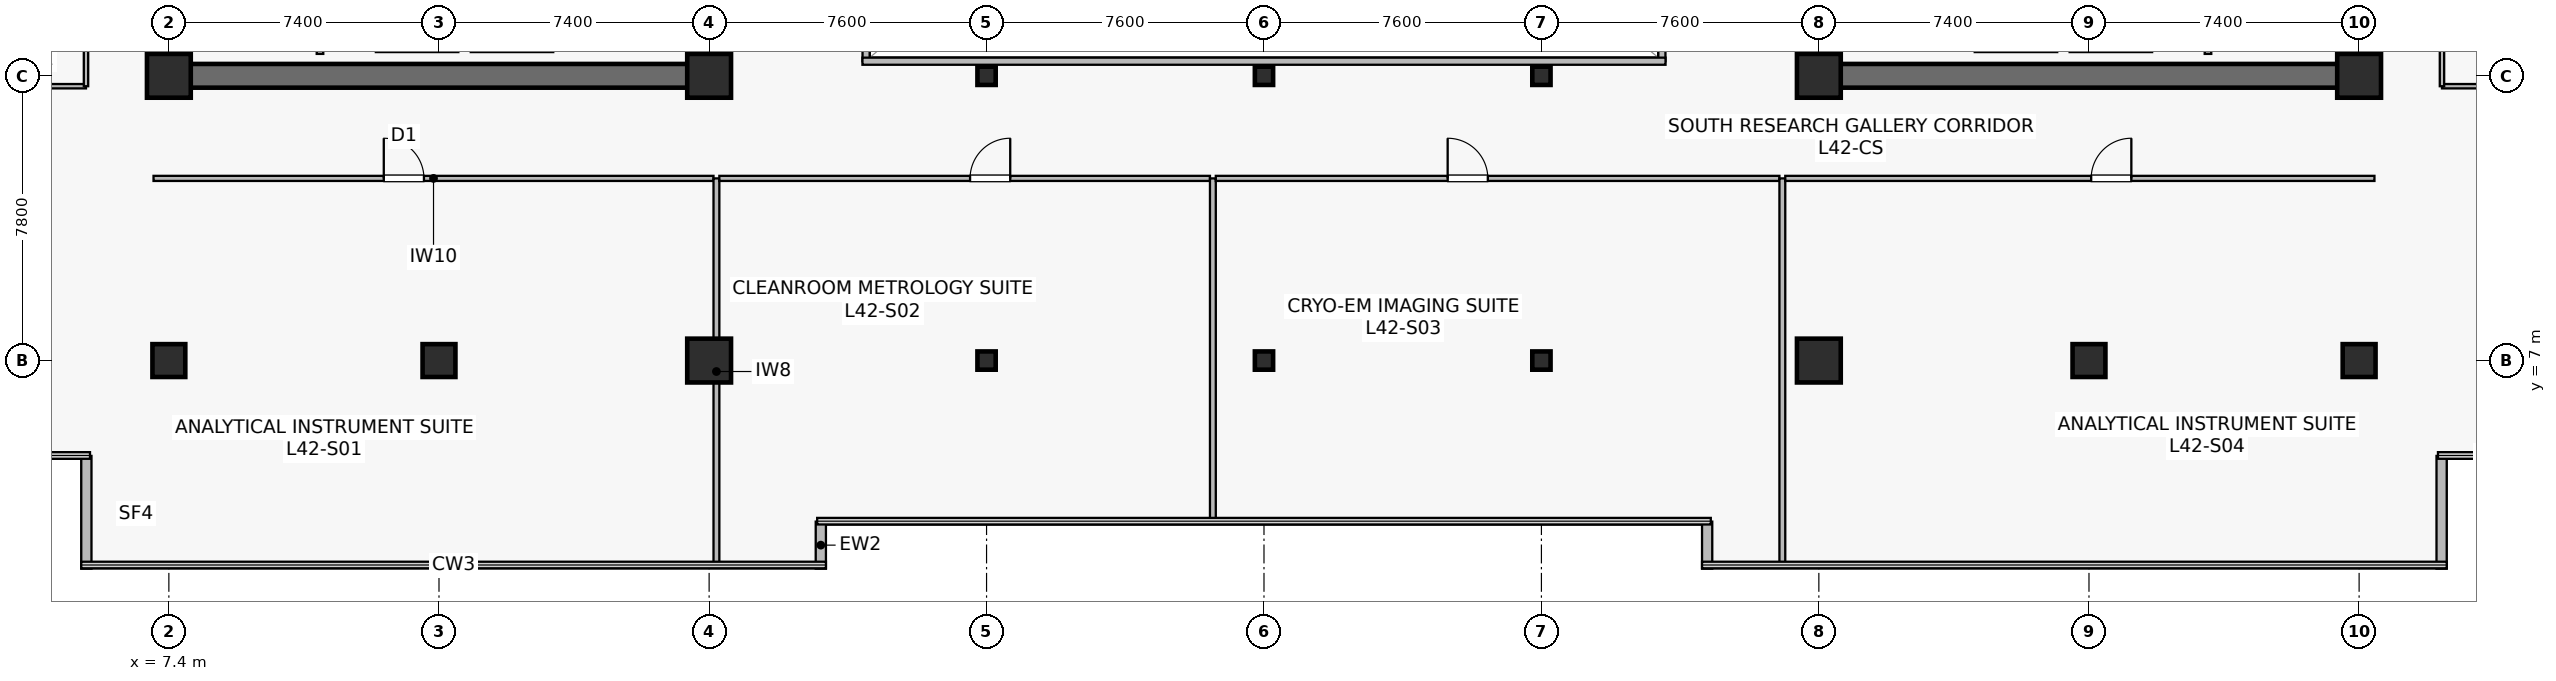
"""IFC4 building model, lengths in metres.
Left out: names, types, materials, properties, quantities, classifications, styles, units other than length and angle.
Written with IfcOpenShell. Run it as: python <this file> out.ifc"""

import sys

from ifc_helpers import new_model, si_unit, direction, frame, frame_2d, origin, origin_2d, place, context, subcontext, project, spatial, rectangle, hollow_rectangle, extrude, source, transform, mapped, element, fill, save


model = new_model("IFC4")
c1 = context("Model", 3, precision=1e-05, world=origin(), true_north=direction((0.0, 1.0)))
c2 = subcontext(c1, "Body", "Model", "MODEL_VIEW")
j1 = project(units=[si_unit("LENGTHUNIT", "METRE"), si_unit("PLANEANGLEUNIT", "RADIAN")], contexts=[c1])
p1 = place(None, origin())
s1 = spatial("IfcSite", under=j1, at=p1, CompositionType="ELEMENT")
p2 = place(p1, origin())
s2 = spatial("IfcBuilding", under=s1, at=p2, CompositionType="ELEMENT")
p3 = place(p2, frame((0.0, 0.0, 174.8)))
s3 = spatial("IfcBuildingStorey", under=s2, at=p3, CompositionType="ELEMENT", Elevation=174.8)
p4 = place(p3, frame((7.075, 14.8, 0.0), z_axis=(0.0, 0.0, 1.0), x_axis=(1.0, 0.0, 0.0)))
e1 = element("IfcWall", 1, at=p4, inside=s3, PredefinedType="SHEAR", context=c2, shape_type="SweptSolid", body=[
    extrude(rectangle(XDim=15.45, YDim=0.65, at=frame_2d((7.725, 0.0))), origin(), (0.0, 0.0, 1.0), 3.79),
])
p5 = place(p3, frame((7.4, 15.125, 0.0), z_axis=(0.0, 0.0, 1.0), x_axis=(0.0, 1.0, 0.0)))
e2 = element("IfcWall", 2, at=p5, inside=s3, PredefinedType="SHEAR", context=c2, shape_type="SweptSolid", body=[
    extrude(rectangle(XDim=18.35, YDim=0.65, at=frame_2d((9.175, 0.0))), origin(), (0.0, 0.0, 1.0), 3.79),
])
p6 = place(p3, frame((22.2, 15.125, 0.0), z_axis=(0.0, 0.0, 1.0), x_axis=(0.0, 1.0, 0.0)))
e3 = element("IfcWall", 3, at=p6, inside=s3, PredefinedType="SHEAR", context=c2, shape_type="SweptSolid", body=[
    extrude(rectangle(XDim=18.35, YDim=0.65, at=frame_2d((9.175, 0.0))), origin(), (0.0, 0.0, 1.0), 3.79),
])
p7 = place(p6, frame((3.425, 0.0, 0.0)))
e4 = element("IfcOpeningElement", 4, at=p7, cuts=e3, PredefinedType="OPENING", context=c2, shape_type="SweptSolid", body=[
    extrude(rectangle(XDim=1.42, YDim=2.2, at=frame_2d((0.71, 1.1))), frame((0.0, 0.335, 0.0), z_axis=(0.0, -1.0, 0.0), x_axis=(1.0, 0.0, 0.0)), (0.0, 0.0, 1.0), 0.67),
])
p8 = place(p3, frame((52.275, 14.8, 0.0), z_axis=(0.0, 0.0, 1.0), x_axis=(1.0, 0.0, 0.0)))
e5 = element("IfcWall", 5, at=p8, inside=s3, PredefinedType="SHEAR", context=c2, shape_type="SweptSolid", body=[
    extrude(rectangle(XDim=15.45, YDim=0.65, at=frame_2d((7.725, 0.0))), origin(), (0.0, 0.0, 1.0), 3.79),
])
p9 = place(p3, frame((52.6, 15.125, 0.0), z_axis=(0.0, 0.0, 1.0), x_axis=(0.0, 1.0, 0.0)))
e6 = element("IfcWall", 6, at=p9, inside=s3, PredefinedType="SHEAR", context=c2, shape_type="SweptSolid", body=[
    extrude(rectangle(XDim=18.35, YDim=0.65, at=frame_2d((9.175, 0.0))), origin(), (0.0, 0.0, 1.0), 3.79),
])
p10 = place(p9, frame((3.425, 0.0, 0.0)))
e7 = element("IfcOpeningElement", 7, at=p10, cuts=e6, PredefinedType="OPENING", context=c2, shape_type="SweptSolid", body=[
    extrude(rectangle(XDim=1.42, YDim=2.2, at=frame_2d((0.71, 1.1))), frame((0.0, 0.335, 0.0), z_axis=(0.0, -1.0, 0.0), x_axis=(1.0, 0.0, 0.0)), (0.0, 0.0, 1.0), 0.67),
])
p11 = place(p3, frame((67.4, 15.125, 0.0), z_axis=(0.0, 0.0, 1.0), x_axis=(0.0, 1.0, 0.0)))
e8 = element("IfcWall", 8, at=p11, inside=s3, PredefinedType="SHEAR", context=c2, shape_type="SweptSolid", body=[
    extrude(rectangle(XDim=18.35, YDim=0.65, at=frame_2d((9.175, 0.0))), origin(), (0.0, 0.0, 1.0), 3.79),
])
m1 = source(origin(), c2, "Body", "SweptSolid", [
    extrude(rectangle(XDim=0.9, YDim=0.9, at=origin_2d()), origin(), (0.0, 0.0, 1.0), 4.1),
])
p12 = place(p3, frame((14.8, 7.0, 0.0), z_axis=(0.0, 0.0, 1.0), x_axis=(1.0, 0.0, 0.0)))
e9 = element("IfcColumn", 9, at=p12, inside=s3, PredefinedType="COLUMN", context=c2, shape_type="MappedRepresentation", body=[
    mapped(m1, transform((0.0, 0.0, 0.0), scale=1.0)),
])
m2 = source(origin(), c2, "Body", "SweptSolid", [
    extrude(rectangle(XDim=1.2, YDim=1.2, at=origin_2d()), origin(), (0.0, 0.0, 1.0), 4.1),
])
for number, where, z_axis, x_axis in (
    (10, (22.2, 7.0, 0.0), (0.0, 0.0, 1.0), (1.0, 0.0, 0.0)),
    (11, (7.4, 14.8, 0.0), (0.0, 0.0, 1.0), (1.0, 0.0, 0.0)),
    (12, (22.2, 14.8, 0.0), (0.0, 0.0, 1.0), (1.0, 0.0, 0.0)),
    (13, (52.6, 7.0, 0.0), (0.0, 0.0, 1.0), (1.0, 0.0, 0.0)),
):
    element("IfcColumn", number, at=place(p3, frame(where, z_axis=z_axis, x_axis=x_axis)), inside=s3, PredefinedType="COLUMN", context=c2, shape_type="MappedRepresentation", body=[
        mapped(m2, transform((0.0, 0.0, 0.0), scale=1.0)),
    ])
p13 = place(p3, frame((60.0, 7.0, 0.0), z_axis=(0.0, 0.0, 1.0), x_axis=(1.0, 0.0, 0.0)))
e14 = element("IfcColumn", 14, at=p13, inside=s3, PredefinedType="COLUMN", context=c2, shape_type="MappedRepresentation", body=[
    mapped(m1, transform((0.0, 0.0, 0.0), scale=1.0)),
])
for number, where, z_axis, x_axis in (
    (15, (52.6, 14.8, 0.0), (0.0, 0.0, 1.0), (1.0, 0.0, 0.0)),
    (16, (67.4, 14.8, 0.0), (0.0, 0.0, 1.0), (1.0, 0.0, 0.0)),
):
    element("IfcColumn", number, at=place(p3, frame(where, z_axis=z_axis, x_axis=x_axis)), inside=s3, PredefinedType="COLUMN", context=c2, shape_type="MappedRepresentation", body=[
        mapped(m2, transform((0.0, 0.0, 0.0), scale=1.0)),
    ])
for number, where, z_axis, x_axis in (
    (17, (7.4, 7.0, 0.0), (0.0, 0.0, 1.0), (1.0, 0.0, 0.0)),
    (18, (67.4, 7.0, 0.0), (0.0, 0.0, 1.0), (1.0, 0.0, 0.0)),
):
    element("IfcColumn", number, at=place(p3, frame(where, z_axis=z_axis, x_axis=x_axis)), inside=s3, PredefinedType="COLUMN", context=c2, shape_type="MappedRepresentation", body=[
        mapped(m1, transform((0.0, 0.0, 0.0), scale=1.0)),
    ])
m3 = source(origin(), c2, "Body", "SweptSolid", [
    extrude(hollow_rectangle(XDim=0.5, YDim=0.5, WallThickness=0.022, at=origin_2d()), origin(), (0.0, 0.0, 1.0), 4.1),
])
for number, where, z_axis, x_axis in (
    (19, (29.8, 7.0, 0.0), (0.0, 0.0, 1.0), (1.0, 0.0, 0.0)),
    (20, (29.8, 14.8, 0.0), (0.0, 0.0, 1.0), (1.0, 0.0, 0.0)),
    (21, (37.4, 7.0, 0.0), (0.0, 0.0, 1.0), (1.0, 0.0, 0.0)),
    (22, (37.4, 14.8, 0.0), (0.0, 0.0, 1.0), (1.0, 0.0, 0.0)),
    (23, (45.0, 7.0, 0.0), (0.0, 0.0, 1.0), (1.0, 0.0, 0.0)),
    (24, (45.0, 14.8, 0.0), (0.0, 0.0, 1.0), (1.0, 0.0, 0.0)),
):
    element("IfcColumn", number, at=place(p3, frame(where, z_axis=z_axis, x_axis=x_axis)), inside=s3, PredefinedType="COLUMN", context=c2, shape_type="MappedRepresentation", body=[
        mapped(m3, transform((0.0, 0.0, 0.0), scale=1.0)),
    ])
for number, where, z_axis, x_axis in (
    (25, (25.26, 1.3, 0.0), (0.0, 0.0, 1.0), (0.0, 1.0, 0.0)),
    (26, (49.54, 2.588, 0.0), (0.0, 0.0, 1.0), (0.0, -1.0, 0.0)),
):
    element("IfcWall", number, at=place(p3, frame(where, z_axis=z_axis, x_axis=x_axis)), inside=s3, PredefinedType="STANDARD", context=c2, shape_type="SweptSolid", body=[
        extrude(rectangle(XDim=1.288, YDim=0.28, at=frame_2d((0.644, 0.0))), origin(), (0.0, 0.0, 1.0), 3.79),
    ])
for number, where, z_axis, x_axis in (
    (27, (69.66, 1.3, 0.0), (0.0, 0.0, 1.0), (0.0, 1.0, 0.0)),
    (28, (5.14, 4.388, 0.0), (0.0, 0.0, 1.0), (0.0, -1.0, 0.0)),
):
    element("IfcWall", number, at=place(p3, frame(where, z_axis=z_axis, x_axis=x_axis)), inside=s3, PredefinedType="STANDARD", context=c2, shape_type="SweptSolid", body=[
        extrude(rectangle(XDim=3.088, YDim=0.28, at=frame_2d((1.544, 0.0))), origin(), (0.0, 0.0, 1.0), 3.79),
    ])
p14 = place(p3, frame((13.07, 15.55, 0.0), z_axis=(0.0, 0.0, 1.0), x_axis=(1.0, 0.0, 0.0)))
e29 = element("IfcWall", 29, at=p14, inside=s3, PredefinedType="SOLIDWALL", context=c2, shape_type="SweptSolid", body=[
    extrude(rectangle(XDim=2.26, YDim=0.2, at=frame_2d((1.13, 0.0))), origin(), (0.0, 0.0, 1.0), 3.187),
])
p15 = place(p3, frame((15.67, 15.55, 0.0), z_axis=(0.0, 0.0, 1.0), x_axis=(1.0, 0.0, 0.0)))
e30 = element("IfcWall", 30, at=p15, inside=s3, PredefinedType="SOLIDWALL", context=c2, shape_type="SweptSolid", body=[
    extrude(rectangle(XDim=2.26, YDim=0.2, at=frame_2d((1.13, 0.0))), origin(), (0.0, 0.0, 1.0), 3.79),
])
p16 = place(p3, frame((11.54, 15.4, 0.0), z_axis=(0.0, 0.0, 1.0), x_axis=(0.0, 1.0, 0.0)))
e31 = element("IfcWall", 31, at=p16, inside=s3, PredefinedType="SOLIDWALL", context=c2, shape_type="SweptSolid", body=[
    extrude(rectangle(XDim=2.4, YDim=0.18, at=frame_2d((1.2, 0.0))), origin(), (0.0, 0.0, 1.0), 3.79),
])
p17 = place(p3, frame((59.47, 15.55, 0.0), z_axis=(0.0, 0.0, 1.0), x_axis=(1.0, 0.0, 0.0)))
e32 = element("IfcWall", 32, at=p17, inside=s3, PredefinedType="SOLIDWALL", context=c2, shape_type="SweptSolid", body=[
    extrude(rectangle(XDim=2.26, YDim=0.2, at=frame_2d((1.13, 0.0))), origin(), (0.0, 0.0, 1.0), 3.187),
])
p18 = place(p3, frame((56.87, 15.55, 0.0), z_axis=(0.0, 0.0, 1.0), x_axis=(1.0, 0.0, 0.0)))
e33 = element("IfcWall", 33, at=p18, inside=s3, PredefinedType="SOLIDWALL", context=c2, shape_type="SweptSolid", body=[
    extrude(rectangle(XDim=2.26, YDim=0.2, at=frame_2d((1.13, 0.0))), origin(), (0.0, 0.0, 1.0), 3.79),
])
p19 = place(p3, frame((63.26, 15.4, 0.0), z_axis=(0.0, 0.0, 1.0), x_axis=(0.0, 1.0, 0.0)))
e34 = element("IfcWall", 34, at=p19, inside=s3, PredefinedType="SOLIDWALL", context=c2, shape_type="SweptSolid", body=[
    extrude(rectangle(XDim=2.4, YDim=0.18, at=frame_2d((1.2, 0.0))), origin(), (0.0, 0.0, 1.0), 3.79),
])
p20 = place(p3, frame((26.5, 15.2, 0.0), z_axis=(0.0, 0.0, 1.0), x_axis=(0.0, 1.0, 0.0)))
e35 = element("IfcWall", 35, at=p20, inside=s3, PredefinedType="SOLIDWALL", context=c2, shape_type="SweptSolid", body=[
    extrude(rectangle(XDim=18.2, YDim=0.195, at=frame_2d((9.1, 0.0))), origin(), (0.0, 0.0, 1.0), 3.79),
])
p21 = place(p20, frame((1.8, 0.0, 0.9)))
e36 = element("IfcOpeningElement", 36, at=p21, cuts=e35, PredefinedType="OPENING", context=c2, shape_type="SweptSolid", body=[
    extrude(rectangle(XDim=1.5, YDim=1.4, at=frame_2d((0.75, 0.7))), frame((0.0, 0.107, 0.0), z_axis=(0.0, -1.0, 0.0), x_axis=(1.0, 0.0, 0.0)), (0.0, 0.0, 1.0), 0.215),
])
p22 = place(p20, frame((13.2, 0.0, 0.9)))
e37 = element("IfcOpeningElement", 37, at=p22, cuts=e35, PredefinedType="OPENING", context=c2, shape_type="SweptSolid", body=[
    extrude(rectangle(XDim=1.5, YDim=1.4, at=frame_2d((0.75, 0.7))), frame((0.0, 0.107, 0.0), z_axis=(0.0, -1.0, 0.0), x_axis=(1.0, 0.0, 0.0)), (0.0, 0.0, 1.0), 0.215),
])
p23 = place(p3, frame((48.3, 15.2, 0.0), z_axis=(0.0, 0.0, 1.0), x_axis=(0.0, 1.0, 0.0)))
e38 = element("IfcWall", 38, at=p23, inside=s3, PredefinedType="SOLIDWALL", context=c2, shape_type="SweptSolid", body=[
    extrude(rectangle(XDim=18.2, YDim=0.195, at=frame_2d((9.1, 0.0))), origin(), (0.0, 0.0, 1.0), 3.79),
])
p24 = place(p23, frame((1.8, 0.0, 0.9)))
e39 = element("IfcOpeningElement", 39, at=p24, cuts=e38, PredefinedType="OPENING", context=c2, shape_type="SweptSolid", body=[
    extrude(rectangle(XDim=1.5, YDim=1.4, at=frame_2d((0.75, 0.7))), frame((0.0, 0.107, 0.0), z_axis=(0.0, -1.0, 0.0), x_axis=(1.0, 0.0, 0.0)), (0.0, 0.0, 1.0), 0.215),
])
p25 = place(p23, frame((13.2, 0.0, 0.9)))
e40 = element("IfcOpeningElement", 40, at=p25, cuts=e38, PredefinedType="OPENING", context=c2, shape_type="SweptSolid", body=[
    extrude(rectangle(XDim=1.5, YDim=1.4, at=frame_2d((0.75, 0.7))), frame((0.0, 0.107, 0.0), z_axis=(0.0, -1.0, 0.0), x_axis=(1.0, 0.0, 0.0)), (0.0, 0.0, 1.0), 0.215),
])
p26 = place(p3, frame((26.4, 15.2, 0.0), z_axis=(0.0, 0.0, 1.0), x_axis=(1.0, 0.0, 0.0)))
e41 = element("IfcWall", 41, at=p26, inside=s3, PredefinedType="SOLIDWALL", context=c2, shape_type="SweptSolid", body=[
    extrude(rectangle(XDim=22.0, YDim=0.195, at=frame_2d((11.0, 0.0))), origin(), (0.0, 0.0, 1.0), 3.79),
])
p27 = place(p3, frame((6.98, 11.99, 0.0), z_axis=(0.0, 0.0, 1.0), x_axis=(1.0, 0.0, 0.0)))
e42 = element("IfcWall", 42, at=p27, inside=s3, PredefinedType="PARTITIONING", context=c2, shape_type="SweptSolid", body=[
    extrude(rectangle(XDim=15.34, YDim=0.14, at=frame_2d((7.67, 0.0))), origin(), (0.0, 0.0, 1.0), 3.187),
])
p28 = place(p27, frame((6.308, 0.0, 0.0)))
e43 = element("IfcOpeningElement", 43, at=p28, cuts=e42, PredefinedType="OPENING", context=c2, shape_type="SweptSolid", body=[
    extrude(rectangle(XDim=1.1, YDim=2.18, at=frame_2d((0.55, 1.09))), frame((0.0, 0.08, 0.0), z_axis=(0.0, -1.0, 0.0), x_axis=(1.0, 0.0, 0.0)), (0.0, 0.0, 1.0), 0.16),
])
p29 = place(p3, frame((22.4, 1.41, 0.0), z_axis=(0.0, 0.0, 1.0), x_axis=(0.0, 1.0, 0.0)))
e44 = element("IfcWall", 44, at=p29, inside=s3, PredefinedType="PARTITIONING", context=c2, shape_type="SweptSolid", body=[
    extrude(rectangle(XDim=10.58, YDim=0.16, at=frame_2d((5.29, 0.0))), origin(), (0.0, 0.0, 1.0), 3.075),
])
p30 = place(p3, frame((22.48, 11.99, 0.0), z_axis=(0.0, 0.0, 1.0), x_axis=(1.0, 0.0, 0.0)))
e45 = element("IfcWall", 45, at=p30, inside=s3, PredefinedType="PARTITIONING", context=c2, shape_type="SweptSolid", body=[
    extrude(rectangle(XDim=13.44, YDim=0.14, at=frame_2d((6.72, 0.0))), origin(), (0.0, 0.0, 1.0), 3.187),
])
p31 = place(p30, frame((6.868, 0.0, 0.0)))
e46 = element("IfcOpeningElement", 46, at=p31, cuts=e45, PredefinedType="OPENING", context=c2, shape_type="SweptSolid", body=[
    extrude(rectangle(XDim=1.1, YDim=2.18, at=frame_2d((0.55, 1.09))), frame((0.0, 0.08, 0.0), z_axis=(0.0, -1.0, 0.0), x_axis=(1.0, 0.0, 0.0)), (0.0, 0.0, 1.0), 0.16),
])
p32 = place(p3, frame((36.0, 2.61, 0.0), z_axis=(0.0, 0.0, 1.0), x_axis=(0.0, 1.0, 0.0)))
e47 = element("IfcWall", 47, at=p32, inside=s3, PredefinedType="PARTITIONING", context=c2, shape_type="SweptSolid", body=[
    extrude(rectangle(XDim=9.38, YDim=0.16, at=frame_2d((4.69, 0.0))), origin(), (0.0, 0.0, 1.0), 3.075),
])
p33 = place(p3, frame((36.08, 11.99, 0.0), z_axis=(0.0, 0.0, 1.0), x_axis=(1.0, 0.0, 0.0)))
e48 = element("IfcWall", 48, at=p33, inside=s3, PredefinedType="PARTITIONING", context=c2, shape_type="SweptSolid", body=[
    extrude(rectangle(XDim=15.44, YDim=0.14, at=frame_2d((7.72, 0.0))), origin(), (0.0, 0.0, 1.0), 3.187),
])
p34 = place(p33, frame((6.352, 0.0, 0.0)))
e49 = element("IfcOpeningElement", 49, at=p34, cuts=e48, PredefinedType="OPENING", context=c2, shape_type="SweptSolid", body=[
    extrude(rectangle(XDim=1.1, YDim=2.18, at=frame_2d((0.55, 1.09))), frame((0.0, 0.08, 0.0), z_axis=(0.0, -1.0, 0.0), x_axis=(1.0, 0.0, 0.0)), (0.0, 0.0, 1.0), 0.16),
])
p35 = place(p3, frame((51.6, 1.41, 0.0), z_axis=(0.0, 0.0, 1.0), x_axis=(0.0, 1.0, 0.0)))
e50 = element("IfcWall", 50, at=p35, inside=s3, PredefinedType="PARTITIONING", context=c2, shape_type="SweptSolid", body=[
    extrude(rectangle(XDim=10.58, YDim=0.16, at=frame_2d((5.29, 0.0))), origin(), (0.0, 0.0, 1.0), 3.075),
])
p36 = place(p3, frame((51.68, 11.99, 0.0), z_axis=(0.0, 0.0, 1.0), x_axis=(1.0, 0.0, 0.0)))
e51 = element("IfcWall", 51, at=p36, inside=s3, PredefinedType="PARTITIONING", context=c2, shape_type="SweptSolid", body=[
    extrude(rectangle(XDim=16.14, YDim=0.14, at=frame_2d((8.07, 0.0))), origin(), (0.0, 0.0, 1.0), 3.187),
])
p37 = place(p36, frame((8.38, 0.0, 0.0)))
e52 = element("IfcOpeningElement", 52, at=p37, cuts=e51, PredefinedType="OPENING", context=c2, shape_type="SweptSolid", body=[
    extrude(rectangle(XDim=1.1, YDim=2.18, at=frame_2d((0.55, 1.09))), frame((0.0, 0.08, 0.0), z_axis=(0.0, -1.0, 0.0), x_axis=(1.0, 0.0, 0.0)), (0.0, 0.0, 1.0), 0.16),
])
p38 = place(p3, frame((2.11, 14.515, 0.0), z_axis=(0.0, 0.0, 1.0), x_axis=(1.0, 0.0, 0.0)))
e53 = element("IfcWall", 53, at=p38, inside=s3, PredefinedType="PARTITIONING", context=c2, shape_type="SweptSolid", body=[
    extrude(rectangle(XDim=3.02, YDim=0.12, at=frame_2d((1.51, 0.0))), origin(), (0.0, 0.0, 1.0), 3.79),
])
p39 = place(p3, frame((5.13, 14.515, 0.0), z_axis=(0.0, 0.0, 1.0), x_axis=(0.0, 1.0, 0.0)))
e54 = element("IfcWall", 54, at=p39, inside=s3, PredefinedType="PARTITIONING", context=c2, shape_type="SweptSolid", body=[
    extrude(rectangle(XDim=5.025, YDim=0.12, at=frame_2d((2.513, 0.0))), origin(), (0.0, 0.0, 1.0), 3.79),
])
p40 = place(p39, frame((2.062, 0.0, 0.0)))
e55 = element("IfcOpeningElement", 55, at=p40, cuts=e54, PredefinedType="OPENING", context=c2, shape_type="SweptSolid", body=[
    extrude(rectangle(XDim=0.9, YDim=2.1, at=frame_2d((0.45, 1.05))), frame((0.0, 0.07, 0.0), z_axis=(0.0, -1.0, 0.0), x_axis=(1.0, 0.0, 0.0)), (0.0, 0.0, 1.0), 0.14),
])
p41 = place(p3, frame((69.67, 14.515, 0.0), z_axis=(0.0, 0.0, 1.0), x_axis=(1.0, 0.0, 0.0)))
e56 = element("IfcWall", 56, at=p41, inside=s3, PredefinedType="PARTITIONING", context=c2, shape_type="SweptSolid", body=[
    extrude(rectangle(XDim=3.02, YDim=0.12, at=frame_2d((1.51, 0.0))), origin(), (0.0, 0.0, 1.0), 3.79),
])
p42 = place(p3, frame((69.67, 14.515, 0.0), z_axis=(0.0, 0.0, 1.0), x_axis=(0.0, 1.0, 0.0)))
e57 = element("IfcWall", 57, at=p42, inside=s3, PredefinedType="PARTITIONING", context=c2, shape_type="SweptSolid", body=[
    extrude(rectangle(XDim=7.425, YDim=0.12, at=frame_2d((3.712, 0.0))), origin(), (0.0, 0.0, 1.0), 3.79),
])
p43 = place(p42, frame((3.262, 0.0, 0.0)))
e58 = element("IfcOpeningElement", 58, at=p43, cuts=e57, PredefinedType="OPENING", context=c2, shape_type="SweptSolid", body=[
    extrude(rectangle(XDim=0.9, YDim=2.1, at=frame_2d((0.45, 1.05))), frame((0.0, 0.07, 0.0), z_axis=(0.0, -1.0, 0.0), x_axis=(1.0, 0.0, 0.0)), (0.0, 0.0, 1.0), 0.14),
])
m4 = source(origin(), c2, "Body", "SweptSolid", [
    extrude(rectangle(XDim=1.1, YDim=2.18, at=frame_2d((0.55, 1.09))), frame((0.0, 0.025, 0.0), z_axis=(0.0, -1.0, 0.0), x_axis=(1.0, 0.0, 0.0)), (0.0, 0.0, 1.0), 0.05),
])
p44 = place(p28, origin())
e59 = element("IfcDoor", 59, at=p44, inside=s3, OperationType="SINGLE_SWING_LEFT", PredefinedType="DOOR", context=c2, shape_type="MappedRepresentation", body=[
    mapped(m4, transform((0.0, 0.0, 0.0), scale=1.0)),
])
fill(e43, e59)
p45 = place(p31, origin())
e60 = element("IfcDoor", 60, at=p45, inside=s3, OperationType="SINGLE_SWING_RIGHT", PredefinedType="DOOR", context=c2, shape_type="MappedRepresentation", body=[
    mapped(m4, transform((0.0, 0.0, 0.0), scale=1.0)),
])
fill(e46, e60)
p46 = place(p34, origin())
e61 = element("IfcDoor", 61, at=p46, inside=s3, OperationType="SINGLE_SWING_LEFT", PredefinedType="DOOR", context=c2, shape_type="MappedRepresentation", body=[
    mapped(m4, transform((0.0, 0.0, 0.0), scale=1.0)),
])
fill(e49, e61)
p47 = place(p37, origin())
e62 = element("IfcDoor", 62, at=p47, inside=s3, OperationType="SINGLE_SWING_RIGHT", PredefinedType="DOOR", context=c2, shape_type="MappedRepresentation", body=[
    mapped(m4, transform((0.0, 0.0, 0.0), scale=1.0)),
])
fill(e52, e62)
save(model, sys.argv[1])
